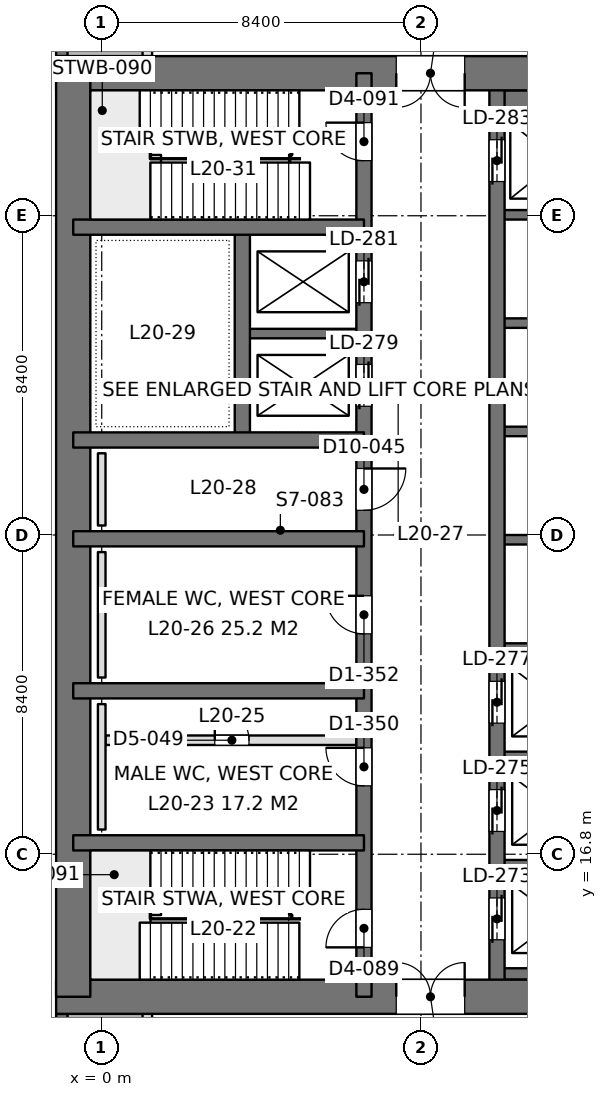
"""IFC4 building model, lengths in metres.
Left out: names, types, materials, properties, quantities, classifications, styles, units other than length and angle.
Written with IfcOpenShell. Run it as: python <this file> out.ifc"""

import sys

from ifc_helpers import new_model, si_unit, direction, frame, frame_2d, origin, place, context, subcontext, project, spatial, rectangle, extrude, element, fill, save


model = new_model("IFC4")
c1 = context("Model", 3, precision=1e-05, world=origin(), true_north=direction((0.0, 1.0)))
c2 = subcontext(c1, "Body", "Model", "MODEL_VIEW")
j1 = project(units=[si_unit("LENGTHUNIT", "METRE"), si_unit("PLANEANGLEUNIT", "RADIAN")], contexts=[c1])
p1 = place(None, origin())
s1 = spatial("IfcSite", under=j1, at=p1, CompositionType="ELEMENT")
p2 = place(p1, origin())
s2 = spatial("IfcBuilding", under=s1, at=p2, CompositionType="ELEMENT")
p3 = place(p2, frame((0.0, 0.0, 90.9)))
s3 = spatial("IfcBuildingStorey", under=s2, at=p3, CompositionType="ELEMENT", Elevation=90.9)
p4 = place(p3, frame((-1.2, 13.05, 0.0), z_axis=(0.0, 0.0, 1.0), x_axis=(1.0, 0.0, 0.0)))
e1 = element("IfcWall", 1, at=p4, inside=s3, PredefinedType="SHEAR", context=c2, shape_type="SweptSolid", body=[
    extrude(rectangle(XDim=18.0, YDim=0.9, at=frame_2d((9.0, 0.0))), origin(), (0.0, 0.0, 1.0), 5.4),
])
p5 = place(p4, frame((8.95, 0.0, 0.0)))
e2 = element("IfcOpeningElement", 2, at=p5, cuts=e1, PredefinedType="OPENING", context=c2, shape_type="SweptSolid", body=[
    extrude(rectangle(XDim=1.8, YDim=2.4, at=frame_2d((0.9, 1.2))), frame((0.0, 0.46, 0.0), z_axis=(0.0, -1.0, 0.0), x_axis=(1.0, 0.0, 0.0)), (0.0, 0.0, 1.0), 0.92),
])
p6 = place(p3, frame((-1.2, 37.35, 0.0), z_axis=(0.0, 0.0, 1.0), x_axis=(1.0, 0.0, 0.0)))
e3 = element("IfcWall", 3, at=p6, inside=s3, PredefinedType="SHEAR", context=c2, shape_type="SweptSolid", body=[
    extrude(rectangle(XDim=18.0, YDim=0.9, at=frame_2d((9.0, 0.0))), origin(), (0.0, 0.0, 1.0), 5.4),
])
p7 = place(p6, frame((8.95, 0.0, 0.0)))
e4 = element("IfcOpeningElement", 4, at=p7, cuts=e3, PredefinedType="OPENING", context=c2, shape_type="SweptSolid", body=[
    extrude(rectangle(XDim=1.8, YDim=2.4, at=frame_2d((0.9, 1.2))), frame((0.0, 0.46, 0.0), z_axis=(0.0, -1.0, 0.0), x_axis=(1.0, 0.0, 0.0)), (0.0, 0.0, 1.0), 0.92),
])
p8 = place(p3, frame((-0.75, 13.05, 0.0), z_axis=(0.0, 0.0, 1.0), x_axis=(0.0, 1.0, 0.0)))
e5 = element("IfcWall", 5, at=p8, inside=s3, PredefinedType="SHEAR", context=c2, shape_type="SweptSolid", body=[
    extrude(rectangle(XDim=24.3, YDim=0.9, at=frame_2d((12.15, 0.0))), origin(), (0.0, 0.0, 1.0), 5.4),
])
p9 = place(p3, frame((6.9, 13.05, 0.0), z_axis=(0.0, 0.0, 1.0), x_axis=(0.0, 1.0, 0.0)))
e6 = element("IfcWall", 6, at=p9, inside=s3, PredefinedType="SHEAR", context=c2, shape_type="SweptSolid", body=[
    extrude(rectangle(XDim=24.3, YDim=0.4, at=frame_2d((12.15, 0.0))), origin(), (0.0, 0.0, 1.0), 5.4),
])
p10 = place(p9, frame((1.3, 0.0, 0.0)))
e7 = element("IfcOpeningElement", 7, at=p10, cuts=e6, PredefinedType="OPENING", context=c2, shape_type="SweptSolid", body=[
    extrude(rectangle(XDim=1.0, YDim=2.2, at=frame_2d((0.5, 1.1))), frame((0.0, 0.21, 0.0), z_axis=(0.0, -1.0, 0.0), x_axis=(1.0, 0.0, 0.0)), (0.0, 0.0, 1.0), 0.42),
])
p11 = place(p9, frame((22.0, 0.0, 0.0)))
e8 = element("IfcOpeningElement", 8, at=p11, cuts=e6, PredefinedType="OPENING", context=c2, shape_type="SweptSolid", body=[
    extrude(rectangle(XDim=1.0, YDim=2.2, at=frame_2d((0.5, 1.1))), frame((0.0, 0.21, 0.0), z_axis=(0.0, -1.0, 0.0), x_axis=(1.0, 0.0, 0.0)), (0.0, 0.0, 1.0), 0.42),
])
p12 = place(p9, frame((5.55, 0.0, 0.0)))
e9 = element("IfcOpeningElement", 9, at=p12, cuts=e6, PredefinedType="OPENING", context=c2, shape_type="SweptSolid", body=[
    extrude(rectangle(XDim=1.0, YDim=2.2, at=frame_2d((0.5, 1.1))), frame((0.0, 0.21, 0.0), z_axis=(0.0, -1.0, 0.0), x_axis=(1.0, 0.0, 0.0)), (0.0, 0.0, 1.0), 0.42),
])
p13 = place(p9, frame((9.55, 0.0, 0.0)))
e10 = element("IfcOpeningElement", 10, at=p13, cuts=e6, PredefinedType="OPENING", context=c2, shape_type="SweptSolid", body=[
    extrude(rectangle(XDim=1.0, YDim=2.2, at=frame_2d((0.5, 1.1))), frame((0.0, 0.21, 0.0), z_axis=(0.0, -1.0, 0.0), x_axis=(1.0, 0.0, 0.0)), (0.0, 0.0, 1.0), 0.42),
])
p14 = place(p9, frame((12.8, 0.0, 0.0)))
e11 = element("IfcOpeningElement", 11, at=p14, cuts=e6, PredefinedType="OPENING", context=c2, shape_type="SweptSolid", body=[
    extrude(rectangle(XDim=1.1, YDim=2.2, at=frame_2d((0.55, 1.1))), frame((0.0, 0.21, 0.0), z_axis=(0.0, -1.0, 0.0), x_axis=(1.0, 0.0, 0.0)), (0.0, 0.0, 1.0), 0.42),
])
p15 = place(p9, frame((15.538, 0.0, 0.0)))
e12 = element("IfcOpeningElement", 12, at=p15, cuts=e6, PredefinedType="OPENING", context=c2, shape_type="SweptSolid", body=[
    extrude(rectangle(XDim=1.1, YDim=2.2, at=frame_2d((0.55, 1.1))), frame((0.0, 0.21, 0.0), z_axis=(0.0, -1.0, 0.0), x_axis=(1.0, 0.0, 0.0)), (0.0, 0.0, 1.0), 0.42),
])
p16 = place(p9, frame((18.262, 0.0, 0.0)))
e13 = element("IfcOpeningElement", 13, at=p16, cuts=e6, PredefinedType="OPENING", context=c2, shape_type="SweptSolid", body=[
    extrude(rectangle(XDim=1.1, YDim=2.2, at=frame_2d((0.55, 1.1))), frame((0.0, 0.21, 0.0), z_axis=(0.0, -1.0, 0.0), x_axis=(1.0, 0.0, 0.0)), (0.0, 0.0, 1.0), 0.42),
])
p17 = place(p3, frame((10.4, 13.05, 0.0), z_axis=(0.0, 0.0, 1.0), x_axis=(0.0, 1.0, 0.0)))
e14 = element("IfcWall", 14, at=p17, inside=s3, PredefinedType="SHEAR", context=c2, shape_type="SweptSolid", body=[
    extrude(rectangle(XDim=24.3, YDim=0.4, at=frame_2d((12.15, 0.0))), origin(), (0.0, 0.0, 1.0), 5.4),
])
p18 = place(p17, frame((1.5, 0.0, 0.0)))
e15 = element("IfcOpeningElement", 15, at=p18, cuts=e14, PredefinedType="OPENING", context=c2, shape_type="SweptSolid", body=[
    extrude(rectangle(XDim=1.1, YDim=2.2, at=frame_2d((0.55, 1.1))), frame((0.0, 0.21, 0.0), z_axis=(0.0, -1.0, 0.0), x_axis=(1.0, 0.0, 0.0)), (0.0, 0.0, 1.0), 0.42),
])
p19 = place(p17, frame((4.35, 0.0, 0.0)))
e16 = element("IfcOpeningElement", 16, at=p19, cuts=e14, PredefinedType="OPENING", context=c2, shape_type="SweptSolid", body=[
    extrude(rectangle(XDim=1.1, YDim=2.2, at=frame_2d((0.55, 1.1))), frame((0.0, 0.21, 0.0), z_axis=(0.0, -1.0, 0.0), x_axis=(1.0, 0.0, 0.0)), (0.0, 0.0, 1.0), 0.42),
])
p20 = place(p17, frame((7.2, 0.0, 0.0)))
e17 = element("IfcOpeningElement", 17, at=p20, cuts=e14, PredefinedType="OPENING", context=c2, shape_type="SweptSolid", body=[
    extrude(rectangle(XDim=1.1, YDim=2.2, at=frame_2d((0.55, 1.1))), frame((0.0, 0.21, 0.0), z_axis=(0.0, -1.0, 0.0), x_axis=(1.0, 0.0, 0.0)), (0.0, 0.0, 1.0), 0.42),
])
p21 = place(p17, frame((21.45, 0.0, 0.0)))
e18 = element("IfcOpeningElement", 18, at=p21, cuts=e14, PredefinedType="OPENING", context=c2, shape_type="SweptSolid", body=[
    extrude(rectangle(XDim=1.1, YDim=2.2, at=frame_2d((0.55, 1.1))), frame((0.0, 0.21, 0.0), z_axis=(0.0, -1.0, 0.0), x_axis=(1.0, 0.0, 0.0)), (0.0, 0.0, 1.0), 0.42),
])
for number, where, z_axis, x_axis in (
    (19, (-0.75, 17.1, 0.0), (0.0, 0.0, 1.0), (1.0, 0.0, 0.0)),
    (20, (-0.75, 21.1, 0.0), (0.0, 0.0, 1.0), (1.0, 0.0, 0.0)),
    (21, (-0.75, 25.1, 0.0), (0.0, 0.0, 1.0), (1.0, 0.0, 0.0)),
    (22, (-0.75, 27.7, 0.0), (0.0, 0.0, 1.0), (1.0, 0.0, 0.0)),
    (23, (-0.75, 33.3, 0.0), (0.0, 0.0, 1.0), (1.0, 0.0, 0.0)),
):
    element("IfcWall", number, at=place(p3, frame(where, z_axis=z_axis, x_axis=x_axis)), inside=s3, PredefinedType="SHEAR", context=c2, shape_type="SweptSolid", body=[
        extrude(rectangle(XDim=7.65, YDim=0.4, at=frame_2d((3.825, 0.0))), origin(), (0.0, 0.0, 1.0), 5.4),
    ])
p22 = place(p3, frame((3.7, 27.7, 0.0), z_axis=(0.0, 0.0, 1.0), x_axis=(0.0, 1.0, 0.0)))
e24 = element("IfcWall", 24, at=p22, inside=s3, PredefinedType="SHEAR", context=c2, shape_type="SweptSolid", body=[
    extrude(rectangle(XDim=5.6, YDim=0.4, at=frame_2d((2.8, 0.0))), origin(), (0.0, 0.0, 1.0), 5.4),
])
p23 = place(p3, frame((3.7, 30.5, 0.0), z_axis=(0.0, 0.0, 1.0), x_axis=(1.0, 0.0, 0.0)))
e25 = element("IfcWall", 25, at=p23, inside=s3, PredefinedType="SHEAR", context=c2, shape_type="SweptSolid", body=[
    extrude(rectangle(XDim=3.2, YDim=0.25, at=frame_2d((1.6, 0.0))), origin(), (0.0, 0.0, 1.0), 5.4),
])
p24 = place(p3, frame((10.4, 13.65, 0.0), z_axis=(0.0, 0.0, 1.0), x_axis=(1.0, 0.0, 0.0)))
e26 = element("IfcWall", 26, at=p24, inside=s3, PredefinedType="SHEAR", context=c2, shape_type="SweptSolid", body=[
    extrude(rectangle(XDim=3.2, YDim=0.3, at=frame_2d((1.6, 0.0))), origin(), (0.0, 0.0, 1.0), 5.4),
])
for number, where, z_axis, x_axis in (
    (27, (10.4, 16.525, 0.0), (0.0, 0.0, 1.0), (1.0, 0.0, 0.0)),
    (28, (10.4, 19.375, 0.0), (0.0, 0.0, 1.0), (1.0, 0.0, 0.0)),
    (29, (10.4, 22.225, 0.0), (0.0, 0.0, 1.0), (1.0, 0.0, 0.0)),
    (30, (10.4, 25.075, 0.0), (0.0, 0.0, 1.0), (1.0, 0.0, 0.0)),
    (31, (10.4, 27.925, 0.0), (0.0, 0.0, 1.0), (1.0, 0.0, 0.0)),
    (32, (10.4, 30.775, 0.0), (0.0, 0.0, 1.0), (1.0, 0.0, 0.0)),
    (33, (10.4, 33.625, 0.0), (0.0, 0.0, 1.0), (1.0, 0.0, 0.0)),
):
    element("IfcWall", number, at=place(p3, frame(where, z_axis=z_axis, x_axis=x_axis)), inside=s3, PredefinedType="SHEAR", context=c2, shape_type="SweptSolid", body=[
        extrude(rectangle(XDim=3.2, YDim=0.25, at=frame_2d((1.6, 0.0))), origin(), (0.0, 0.0, 1.0), 5.4),
    ])
p25 = place(p3, frame((10.4, 36.625, 0.0), z_axis=(0.0, 0.0, 1.0), x_axis=(1.0, 0.0, 0.0)))
e34 = element("IfcWall", 34, at=p25, inside=s3, PredefinedType="SHEAR", context=c2, shape_type="SweptSolid", body=[
    extrude(rectangle(XDim=3.2, YDim=0.55, at=frame_2d((1.6, 0.0))), origin(), (0.0, 0.0, 1.0), 5.4),
])
p26 = place(p3, frame((-1.05, 8.4, 0.0), z_axis=(0.0, 0.0, 1.0), x_axis=(0.0, 1.0, 0.0)))
e35 = element("IfcWall", 35, at=p26, inside=s3, PredefinedType="SOLIDWALL", context=c2, shape_type="SweptSolid", body=[
    extrude(rectangle(XDim=4.2, YDim=0.3, at=frame_2d((2.1, 0.0))), origin(), (0.0, 0.0, 1.0), 5.24),
])
p27 = place(p26, frame((0.9, 0.0, 1.2)))
e36 = element("IfcOpeningElement", 36, at=p27, cuts=e35, PredefinedType="OPENING", context=c2, shape_type="SweptSolid", body=[
    extrude(rectangle(XDim=2.4, YDim=2.4, at=frame_2d((1.2, 1.2))), frame((0.0, 0.16, 0.0), z_axis=(0.0, -1.0, 0.0), x_axis=(1.0, 0.0, 0.0)), (0.0, 0.0, 1.0), 0.32),
])
p28 = place(p3, frame((-1.05, 37.8, 0.0), z_axis=(0.0, 0.0, 1.0), x_axis=(0.0, 1.0, 0.0)))
e37 = element("IfcWall", 37, at=p28, inside=s3, PredefinedType="SOLIDWALL", context=c2, shape_type="SweptSolid", body=[
    extrude(rectangle(XDim=4.2, YDim=0.3, at=frame_2d((2.1, 0.0))), origin(), (0.0, 0.0, 1.0), 5.24),
])
p29 = place(p28, frame((0.9, 0.0, 1.2)))
e38 = element("IfcOpeningElement", 38, at=p29, cuts=e37, PredefinedType="OPENING", context=c2, shape_type="SweptSolid", body=[
    extrude(rectangle(XDim=2.4, YDim=2.4, at=frame_2d((1.2, 1.2))), frame((0.0, 0.16, 0.0), z_axis=(0.0, -1.0, 0.0), x_axis=(1.0, 0.0, 0.0)), (0.0, 0.0, 1.0), 0.32),
])
p30 = place(p3, frame((1.2, 10.8, 0.0), z_axis=(0.0, 0.0, 1.0), x_axis=(0.0, 1.0, 0.0)))
e39 = element("IfcWall", 39, at=p30, inside=s3, PredefinedType="PARTITIONING", context=c2, shape_type="SweptSolid", body=[
    extrude(rectangle(XDim=1.802, YDim=0.25, at=frame_2d((0.901, 0.0))), origin(), (0.0, 0.0, 1.0), 5.24),
])
p31 = place(p3, frame((1.2, 37.8, 0.0), z_axis=(0.0, 0.0, 1.0), x_axis=(0.0, 1.0, 0.0)))
e40 = element("IfcWall", 40, at=p31, inside=s3, PredefinedType="PARTITIONING", context=c2, shape_type="SweptSolid", body=[
    extrude(rectangle(XDim=1.8, YDim=0.25, at=frame_2d((0.9, 0.0))), origin(), (0.0, 0.0, 1.0), 5.24),
])
p32 = place(p3, frame((0.1, 19.8, 0.0), z_axis=(0.0, 0.0, 1.0), x_axis=(1.0, 0.0, 0.0)))
e41 = element("IfcWall", 41, at=p32, inside=s3, PredefinedType="PARTITIONING", context=c2, shape_type="SweptSolid", body=[
    extrude(rectangle(XDim=6.6, YDim=0.25, at=frame_2d((3.3, 0.0))), origin(), (0.0, 0.0, 1.0), 5.2),
])
p33 = place(p32, frame((2.875, 0.0, 0.0)))
e42 = element("IfcOpeningElement", 42, at=p33, cuts=e41, PredefinedType="OPENING", context=c2, shape_type="SweptSolid", body=[
    extrude(rectangle(XDim=0.9, YDim=2.2, at=frame_2d((0.45, 1.1))), frame((0.0, 0.135, 0.0), z_axis=(0.0, -1.0, 0.0), x_axis=(1.0, 0.0, 0.0)), (0.0, 0.0, 1.0), 0.27),
])
for number, where, z_axis, x_axis in (
    (43, (0.0, 17.45, 0.0), (0.0, 0.0, 1.0), (0.0, 1.0, 0.0)),
    (44, (0.0, 21.45, 0.0), (0.0, 0.0, 1.0), (0.0, 1.0, 0.0)),
):
    element("IfcWall", number, at=place(p3, frame(where, z_axis=z_axis, x_axis=x_axis)), inside=s3, PredefinedType="PLUMBINGWALL", context=c2, shape_type="SweptSolid", body=[
        extrude(rectangle(XDim=3.3, YDim=0.2, at=frame_2d((1.65, 0.0))), origin(), (0.0, 0.0, 1.0), 1.2),
    ])
p34 = place(p3, frame((0.0, 25.45, 0.0), z_axis=(0.0, 0.0, 1.0), x_axis=(0.0, 1.0, 0.0)))
e45 = element("IfcWall", 45, at=p34, inside=s3, PredefinedType="PLUMBINGWALL", context=c2, shape_type="SweptSolid", body=[
    extrude(rectangle(XDim=1.9, YDim=0.2, at=frame_2d((0.95, 0.0))), origin(), (0.0, 0.0, 1.0), 1.2),
])
p35 = place(p5, origin())
e46 = element("IfcDoor", 46, at=p35, inside=s3, OperationType="DOUBLE_DOOR_SINGLE_SWING", PredefinedType="DOOR", context=c2, shape_type="SweptSolid", body=[
    extrude(rectangle(XDim=1.8, YDim=2.4, at=frame_2d((0.9, 1.2))), frame((0.0, 0.025, 0.0), z_axis=(0.0, -1.0, 0.0), x_axis=(1.0, 0.0, 0.0)), (0.0, 0.0, 1.0), 0.05),
])
fill(e2, e46)
p36 = place(p7, frame((1.8, 0.0, 0.0), z_axis=(0.0, 0.0, 1.0), x_axis=(-1.0, 0.0, 0.0)))
e47 = element("IfcDoor", 47, at=p36, inside=s3, OperationType="DOUBLE_DOOR_SINGLE_SWING", PredefinedType="DOOR", context=c2, shape_type="SweptSolid", body=[
    extrude(rectangle(XDim=1.8, YDim=2.4, at=frame_2d((0.9, 1.2))), frame((0.0, 0.025, 0.0), z_axis=(0.0, -1.0, 0.0), x_axis=(1.0, 0.0, 0.0)), (0.0, 0.0, 1.0), 0.05),
])
fill(e4, e47)
p37 = place(p10, origin())
e48 = element("IfcDoor", 48, at=p37, inside=s3, OperationType="SINGLE_SWING_LEFT", PredefinedType="DOOR", context=c2, shape_type="SweptSolid", body=[
    extrude(rectangle(XDim=1.0, YDim=2.2, at=frame_2d((0.5, 1.1))), frame((0.0, 0.025, 0.0), z_axis=(0.0, -1.0, 0.0), x_axis=(1.0, 0.0, 0.0)), (0.0, 0.0, 1.0), 0.05),
])
fill(e7, e48)
p38 = place(p11, origin())
e49 = element("IfcDoor", 49, at=p38, inside=s3, OperationType="SINGLE_SWING_RIGHT", PredefinedType="DOOR", context=c2, shape_type="SweptSolid", body=[
    extrude(rectangle(XDim=1.0, YDim=2.2, at=frame_2d((0.5, 1.1))), frame((0.0, 0.025, 0.0), z_axis=(0.0, -1.0, 0.0), x_axis=(1.0, 0.0, 0.0)), (0.0, 0.0, 1.0), 0.05),
])
fill(e8, e49)
p39 = place(p12, origin())
e50 = element("IfcDoor", 50, at=p39, inside=s3, OperationType="SINGLE_SWING_RIGHT", PredefinedType="DOOR", context=c2, shape_type="SweptSolid", body=[
    extrude(rectangle(XDim=1.0, YDim=2.2, at=frame_2d((0.5, 1.1))), frame((0.0, 0.025, 0.0), z_axis=(0.0, -1.0, 0.0), x_axis=(1.0, 0.0, 0.0)), (0.0, 0.0, 1.0), 0.05),
])
fill(e9, e50)
p40 = place(p13, origin())
e51 = element("IfcDoor", 51, at=p40, inside=s3, OperationType="SINGLE_SWING_RIGHT", PredefinedType="DOOR", context=c2, shape_type="SweptSolid", body=[
    extrude(rectangle(XDim=1.0, YDim=2.2, at=frame_2d((0.5, 1.1))), frame((0.0, 0.025, 0.0), z_axis=(0.0, -1.0, 0.0), x_axis=(1.0, 0.0, 0.0)), (0.0, 0.0, 1.0), 0.05),
])
fill(e10, e51)
p41 = place(p14, frame((1.1, 0.0, 0.0), z_axis=(0.0, 0.0, 1.0), x_axis=(-1.0, 0.0, 0.0)))
e52 = element("IfcDoor", 52, at=p41, inside=s3, OperationType="SINGLE_SWING_LEFT", PredefinedType="DOOR", context=c2, shape_type="SweptSolid", body=[
    extrude(rectangle(XDim=1.1, YDim=2.2, at=frame_2d((0.55, 1.1))), frame((0.0, 0.025, 0.0), z_axis=(0.0, -1.0, 0.0), x_axis=(1.0, 0.0, 0.0)), (0.0, 0.0, 1.0), 0.05),
])
fill(e11, e52)
p42 = place(p18, origin())
e53 = element("IfcDoor", 53, at=p42, inside=s3, OperationType="DOUBLE_DOOR_SLIDING", PredefinedType="DOOR", context=c2, shape_type="SweptSolid", body=[
    extrude(rectangle(XDim=1.1, YDim=2.2, at=frame_2d((0.55, 1.1))), frame((0.0, 0.025, 0.0), z_axis=(0.0, -1.0, 0.0), x_axis=(1.0, 0.0, 0.0)), (0.0, 0.0, 1.0), 0.05),
])
fill(e15, e53)
p43 = place(p19, origin())
e54 = element("IfcDoor", 54, at=p43, inside=s3, OperationType="DOUBLE_DOOR_SLIDING", PredefinedType="DOOR", context=c2, shape_type="SweptSolid", body=[
    extrude(rectangle(XDim=1.1, YDim=2.2, at=frame_2d((0.55, 1.1))), frame((0.0, 0.025, 0.0), z_axis=(0.0, -1.0, 0.0), x_axis=(1.0, 0.0, 0.0)), (0.0, 0.0, 1.0), 0.05),
])
fill(e16, e54)
p44 = place(p20, origin())
e55 = element("IfcDoor", 55, at=p44, inside=s3, OperationType="DOUBLE_DOOR_SLIDING", PredefinedType="DOOR", context=c2, shape_type="SweptSolid", body=[
    extrude(rectangle(XDim=1.1, YDim=2.2, at=frame_2d((0.55, 1.1))), frame((0.0, 0.025, 0.0), z_axis=(0.0, -1.0, 0.0), x_axis=(1.0, 0.0, 0.0)), (0.0, 0.0, 1.0), 0.05),
])
fill(e17, e55)
p45 = place(p21, origin())
e56 = element("IfcDoor", 56, at=p45, inside=s3, OperationType="DOUBLE_DOOR_SLIDING", PredefinedType="DOOR", context=c2, shape_type="SweptSolid", body=[
    extrude(rectangle(XDim=1.1, YDim=2.2, at=frame_2d((0.55, 1.1))), frame((0.0, 0.025, 0.0), z_axis=(0.0, -1.0, 0.0), x_axis=(1.0, 0.0, 0.0)), (0.0, 0.0, 1.0), 0.05),
])
fill(e18, e56)
p46 = place(p15, origin())
e57 = element("IfcDoor", 57, at=p46, inside=s3, OperationType="DOUBLE_DOOR_SLIDING", PredefinedType="DOOR", context=c2, shape_type="SweptSolid", body=[
    extrude(rectangle(XDim=1.1, YDim=2.2, at=frame_2d((0.55, 1.1))), frame((0.0, 0.025, 0.0), z_axis=(0.0, -1.0, 0.0), x_axis=(1.0, 0.0, 0.0)), (0.0, 0.0, 1.0), 0.05),
])
fill(e12, e57)
p47 = place(p16, origin())
e58 = element("IfcDoor", 58, at=p47, inside=s3, OperationType="DOUBLE_DOOR_SLIDING", PredefinedType="DOOR", context=c2, shape_type="SweptSolid", body=[
    extrude(rectangle(XDim=1.1, YDim=2.2, at=frame_2d((0.55, 1.1))), frame((0.0, 0.025, 0.0), z_axis=(0.0, -1.0, 0.0), x_axis=(1.0, 0.0, 0.0)), (0.0, 0.0, 1.0), 0.05),
])
fill(e13, e58)
p48 = place(p33, origin())
e59 = element("IfcDoor", 59, at=p48, inside=s3, OperationType="SINGLE_SWING_LEFT", PredefinedType="DOOR", context=c2, shape_type="SweptSolid", body=[
    extrude(rectangle(XDim=0.9, YDim=2.2, at=frame_2d((0.45, 1.1))), frame((0.0, 0.025, 0.0), z_axis=(0.0, -1.0, 0.0), x_axis=(1.0, 0.0, 0.0)), (0.0, 0.0, 1.0), 0.05),
])
fill(e42, e59)
save(model, sys.argv[1])
